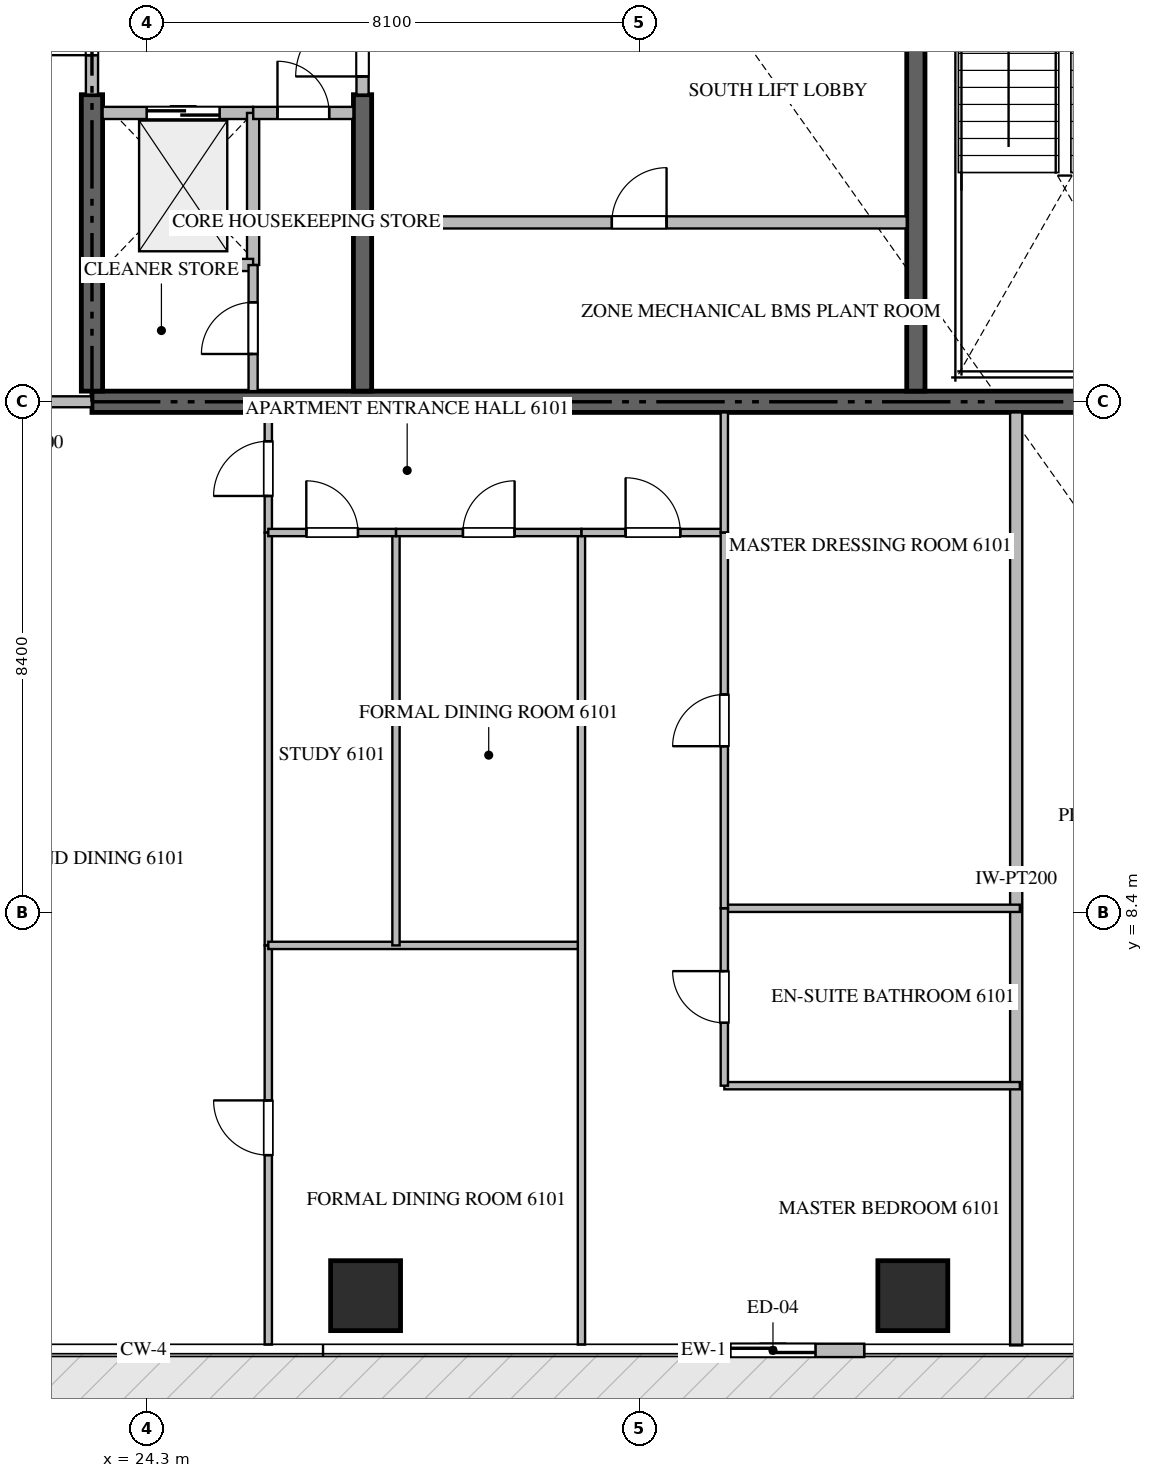
"""IFC4 building model, lengths in metres.
Left out: names, types, materials, properties, quantities, classifications, styles, units other than length and angle.
Written with IfcOpenShell. Run it as: python <this file> out.ifc"""

import sys

from ifc_helpers import new_model, si_unit, direction, frame, frame_2d, origin, origin_2d, place, context, subcontext, project, spatial, rectangle, extrude, source, transform, mapped, element, fill, save


model = new_model("IFC4")
c1 = context("Model", 3, precision=1e-05, world=origin(), true_north=direction((0.0, 1.0)))
c2 = subcontext(c1, "Body", "Model", "MODEL_VIEW")
j1 = project(units=[si_unit("LENGTHUNIT", "METRE"), si_unit("PLANEANGLEUNIT", "RADIAN")], contexts=[c1])
p1 = place(None, origin())
s1 = spatial("IfcSite", under=j1, at=p1, CompositionType="ELEMENT")
p2 = place(p1, origin())
s2 = spatial("IfcBuilding", under=s1, at=p2, CompositionType="ELEMENT")
p3 = place(p2, frame((0.0, 0.0, 245.1)))
s3 = spatial("IfcBuildingStorey", under=s2, at=p3, CompositionType="ELEMENT", Elevation=245.1)
p4 = place(p3, frame((23.4, 16.8, -0.26), z_axis=(0.0, 0.0, 1.0), x_axis=(1.0, 0.0, 0.0)))
e1 = element("IfcWall", 1, at=p4, inside=s3, PredefinedType="SHEAR", context=c2, shape_type="SweptSolid", body=[
    extrude(rectangle(XDim=18.0, YDim=0.35, at=frame_2d((9.0, 0.0))), origin(), (0.0, 0.0, 1.0), 3.848),
])
p5 = place(p3, frame((23.4, 16.975, -0.26), z_axis=(0.0, 0.0, 1.0), x_axis=(0.0, 1.0, 0.0)))
e2 = element("IfcWall", 2, at=p5, inside=s3, PredefinedType="SHEAR", context=c2, shape_type="SweptSolid", body=[
    extrude(rectangle(XDim=4.875, YDim=0.35, at=frame_2d((2.438, 0.0))), origin(), (0.0, 0.0, 1.0), 3.848),
])
p6 = place(p3, frame((27.85, 16.975, -0.26), z_axis=(0.0, 0.0, 1.0), x_axis=(0.0, 1.0, 0.0)))
e3 = element("IfcWall", 3, at=p6, inside=s3, PredefinedType="SHEAR", context=c2, shape_type="SweptSolid", body=[
    extrude(rectangle(XDim=4.875, YDim=0.3, at=frame_2d((2.438, 0.0))), origin(), (0.0, 0.0, 1.0), 3.848),
])
p7 = place(p3, frame((36.95, 16.975, -0.26), z_axis=(0.0, 0.0, 1.0), x_axis=(0.0, 1.0, 0.0)))
e4 = element("IfcWall", 4, at=p7, inside=s3, PredefinedType="SHEAR", context=c2, shape_type="SweptSolid", body=[
    extrude(rectangle(XDim=8.375, YDim=0.3, at=frame_2d((4.188, 0.0))), origin(), (0.0, 0.0, 1.0), 3.848),
])
m1 = source(origin(), c2, "Body", "SweptSolid", [
    extrude(rectangle(XDim=1.15, YDim=1.15, at=origin_2d()), origin(), (0.0, 0.0, 1.0), 3.85),
])
for number, where, z_axis, x_axis in (
    (5, (27.9, 2.1, -0.26), (0.0, 0.0, 1.0), (1.0, 0.0, 0.0)),
    (6, (36.9, 2.1, -0.26), (0.0, 0.0, 1.0), (1.0, 0.0, 0.0)),
):
    element("IfcColumn", number, at=place(p3, frame(where, z_axis=z_axis, x_axis=x_axis)), inside=s3, PredefinedType="COLUMN", context=c2, shape_type="MappedRepresentation", body=[
        mapped(m1, transform((0.0, 0.0, 0.0), scale=1.0)),
    ])
p8 = place(p3, frame((33.1, 1.2, 0.0), z_axis=(0.0, 0.0, 1.0), x_axis=(1.0, 0.0, 0.0)))
e7 = element("IfcWall", 7, at=p8, inside=s3, PredefinedType="ELEMENTEDWALL", context=c2, shape_type="SweptSolid", body=[
    extrude(rectangle(XDim=3.0, YDim=0.22, at=frame_2d((1.5, 0.0))), origin(), (0.0, 0.0, 1.0), 3.575),
])
p9 = place(p8, frame((0.8, 0.0, 0.0)))
e8 = element("IfcOpeningElement", 8, at=p9, cuts=e7, PredefinedType="OPENING", context=c2, shape_type="SweptSolid", body=[
    extrude(rectangle(XDim=1.4, YDim=2.25, at=frame_2d((0.7, 1.125))), frame((0.0, 0.12, 0.0), z_axis=(0.0, -1.0, 0.0), x_axis=(1.0, 0.0, 0.0)), (0.0, 0.0, 1.0), 0.24),
])
p10 = place(p3, frame((23.575, 21.55, 0.0), z_axis=(0.0, 0.0, 1.0), x_axis=(1.0, 0.0, 0.0)))
e9 = element("IfcWall", 9, at=p10, inside=s3, PredefinedType="STANDARD", context=c2, shape_type="SweptSolid", body=[
    extrude(rectangle(XDim=2.475, YDim=0.2, at=frame_2d((1.238, 0.0))), origin(), (0.0, 0.0, 1.0), 3.59),
])
p11 = place(p10, frame((0.725, 0.0, 0.0)))
e10 = element("IfcOpeningElement", 10, at=p11, cuts=e9, PredefinedType="OPENING", context=c2, shape_type="SweptSolid", body=[
    extrude(rectangle(XDim=1.2, YDim=2.2, at=frame_2d((0.6, 1.1))), frame((0.0, 0.11, 0.0), z_axis=(0.0, -1.0, 0.0), x_axis=(1.0, 0.0, 0.0)), (0.0, 0.0, 1.0), 0.22),
])
p12 = place(p3, frame((26.05, 19.05, 0.0), z_axis=(0.0, 0.0, 1.0), x_axis=(0.0, 1.0, 0.0)))
e11 = element("IfcWall", 11, at=p12, inside=s3, PredefinedType="STANDARD", context=c2, shape_type="SweptSolid", body=[
    extrude(rectangle(XDim=2.5, YDim=0.2, at=frame_2d((1.25, 0.0))), origin(), (0.0, 0.0, 1.0), 3.59),
])
p13 = place(p3, frame((23.575, 19.05, 0.0), z_axis=(0.0, 0.0, 1.0), x_axis=(1.0, 0.0, 0.0)))
e12 = element("IfcWall", 12, at=p13, inside=s3, PredefinedType="STANDARD", context=c2, shape_type="SweptSolid", body=[
    extrude(rectangle(XDim=2.475, YDim=0.2, at=frame_2d((1.238, 0.0))), origin(), (0.0, 0.0, 1.0), 3.59),
])
p14 = place(p3, frame((26.052, 21.55, 0.0), z_axis=(0.0, 0.0, 1.0), x_axis=(1.0, 0.0, 0.0)))
e13 = element("IfcWall", 13, at=p14, inside=s3, PredefinedType="STANDARD", context=c2, shape_type="SweptSolid", body=[
    extrude(rectangle(XDim=1.648, YDim=0.2, at=frame_2d((0.824, 0.0))), origin(), (0.0, 0.0, 1.0), 3.59),
])
p15 = place(p14, frame((0.399, 0.0, 0.0)))
e14 = element("IfcOpeningElement", 14, at=p15, cuts=e13, PredefinedType="OPENING", context=c2, shape_type="SweptSolid", body=[
    extrude(rectangle(XDim=0.85, YDim=2.1, at=frame_2d((0.425, 1.05))), frame((0.0, 0.11, 0.0), z_axis=(0.0, -1.0, 0.0), x_axis=(1.0, 0.0, 0.0)), (0.0, 0.0, 1.0), 0.22),
])
p16 = place(p3, frame((23.4, 21.852, 0.0), z_axis=(0.0, 0.0, 1.0), x_axis=(0.0, 1.0, 0.0)))
e15 = element("IfcWall", 15, at=p16, inside=s3, PredefinedType="STANDARD", context=c2, shape_type="SweptSolid", body=[
    extrude(rectangle(XDim=2.396, YDim=0.2, at=frame_2d((1.198, 0.0))), origin(), (0.0, 0.0, 1.0), 3.59),
])
p17 = place(p16, frame((0.648, 0.0, 0.0)))
e16 = element("IfcOpeningElement", 16, at=p17, cuts=e15, PredefinedType="OPENING", context=c2, shape_type="SweptSolid", body=[
    extrude(rectangle(XDim=1.1, YDim=2.15, at=frame_2d((0.55, 1.075))), frame((0.0, 0.11, 0.0), z_axis=(0.0, -1.0, 0.0), x_axis=(1.0, 0.0, 0.0)), (0.0, 0.0, 1.0), 0.22),
])
p18 = place(p3, frame((27.85, 21.852, 0.0), z_axis=(0.0, 0.0, 1.0), x_axis=(0.0, 1.0, 0.0)))
e17 = element("IfcWall", 17, at=p18, inside=s3, PredefinedType="STANDARD", context=c2, shape_type="SweptSolid", body=[
    extrude(rectangle(XDim=1.696, YDim=0.2, at=frame_2d((0.848, 0.0))), origin(), (0.0, 0.0, 1.0), 3.59),
])
p19 = place(p18, frame((0.298, 0.0, 0.0)))
e18 = element("IfcOpeningElement", 18, at=p19, cuts=e17, PredefinedType="OPENING", context=c2, shape_type="SweptSolid", body=[
    extrude(rectangle(XDim=1.1, YDim=2.15, at=frame_2d((0.55, 1.075))), frame((0.0, 0.11, 0.0), z_axis=(0.0, -1.0, 0.0), x_axis=(1.0, 0.0, 0.0)), (0.0, 0.0, 1.0), 0.22),
])
p20 = place(p3, frame((26.05, 16.975, 0.0), z_axis=(0.0, 0.0, 1.0), x_axis=(0.0, 1.0, 0.0)))
e19 = element("IfcWall", 19, at=p20, inside=s3, PredefinedType="PARTITIONING", context=c2, shape_type="SweptSolid", body=[
    extrude(rectangle(XDim=2.073, YDim=0.15, at=frame_2d((1.037, 0.0))), origin(), (0.0, 0.0, 1.0), 3.59),
])
p21 = place(p20, frame((0.611, 0.0, 0.0)))
e20 = element("IfcOpeningElement", 20, at=p21, cuts=e19, PredefinedType="OPENING", context=c2, shape_type="SweptSolid", body=[
    extrude(rectangle(XDim=0.85, YDim=2.1, at=frame_2d((0.425, 1.05))), frame((0.0, 0.085, 0.0), z_axis=(0.0, -1.0, 0.0), x_axis=(1.0, 0.0, 0.0)), (0.0, 0.0, 1.0), 0.17),
])
p22 = place(p3, frame((28.0, 19.75, 0.0), z_axis=(0.0, 0.0, 1.0), x_axis=(1.0, 0.0, 0.0)))
e21 = element("IfcWall", 21, at=p22, inside=s3, PredefinedType="STANDARD", context=c2, shape_type="SweptSolid", body=[
    extrude(rectangle(XDim=8.8, YDim=0.2, at=frame_2d((4.4, 0.0))), origin(), (0.0, 0.0, 1.0), 3.59),
])
p23 = place(p22, frame((3.95, 0.0, 0.0)))
e22 = element("IfcOpeningElement", 22, at=p23, cuts=e21, PredefinedType="OPENING", context=c2, shape_type="SweptSolid", body=[
    extrude(rectangle(XDim=0.9, YDim=2.1, at=frame_2d((0.45, 1.05))), frame((0.0, 0.11, 0.0), z_axis=(0.0, -1.0, 0.0), x_axis=(1.0, 0.0, 0.0)), (0.0, 0.0, 1.0), 0.22),
])
p24 = place(p3, frame((38.6, 1.282, 0.0), z_axis=(0.0, 0.0, 1.0), x_axis=(0.0, 1.0, 0.0)))
e23 = element("IfcWall", 23, at=p24, inside=s3, PredefinedType="PARTITIONING", context=c2, shape_type="SweptSolid", body=[
    extrude(rectangle(XDim=15.343, YDim=0.2, at=frame_2d((7.671, 0.0))), origin(), (0.0, 0.0, 1.0), 3.59),
])
p25 = place(p3, frame((20.902, 16.8, 0.0), z_axis=(0.0, 0.0, 1.0), x_axis=(1.0, 0.0, 0.0)))
e24 = element("IfcWall", 24, at=p25, inside=s3, PredefinedType="PARTITIONING", context=c2, shape_type="SweptSolid", body=[
    extrude(rectangle(XDim=2.496, YDim=0.18, at=frame_2d((1.248, 0.0))), origin(), (0.0, 0.0, 1.0), 3.59),
])
p26 = place(p25, frame((0.748, 0.0, 0.0)))
e25 = element("IfcOpeningElement", 25, at=p26, cuts=e24, PredefinedType="OPENING", context=c2, shape_type="SweptSolid", body=[
    extrude(rectangle(XDim=1.0, YDim=2.15, at=frame_2d((0.5, 1.075))), frame((0.0, 0.1, 0.0), z_axis=(0.0, -1.0, 0.0), x_axis=(1.0, 0.0, 0.0)), (0.0, 0.0, 1.0), 0.2),
])
p27 = place(p3, frame((26.3, 14.65, 0.0), z_axis=(0.0, 0.0, 1.0), x_axis=(0.0, 1.0, 0.0)))
e26 = element("IfcWall", 26, at=p27, inside=s3, PredefinedType="PARTITIONING", context=c2, shape_type="SweptSolid", body=[
    extrude(rectangle(XDim=1.975, YDim=0.12, at=frame_2d((0.988, 0.0))), origin(), (0.0, 0.0, 1.0), 3.59),
])
p28 = place(p27, frame((0.601, 0.0, 0.0)))
e27 = element("IfcOpeningElement", 27, at=p28, cuts=e26, PredefinedType="OPENING", context=c2, shape_type="SweptSolid", body=[
    extrude(rectangle(XDim=0.9, YDim=2.1, at=frame_2d((0.45, 1.05))), frame((0.0, 0.07, 0.0), z_axis=(0.0, -1.0, 0.0), x_axis=(1.0, 0.0, 0.0)), (0.0, 0.0, 1.0), 0.14),
])
p29 = place(p3, frame((26.3, 1.295, 0.0), z_axis=(0.0, 0.0, 1.0), x_axis=(0.0, 1.0, 0.0)))
e28 = element("IfcWall", 28, at=p29, inside=s3, PredefinedType="PARTITIONING", context=c2, shape_type="SweptSolid", body=[
    extrude(rectangle(XDim=6.565, YDim=0.12, at=frame_2d((3.283, 0.0))), origin(), (0.0, 0.0, 1.0), 3.59),
])
p30 = place(p29, frame((3.116, 0.0, 0.0)))
e29 = element("IfcOpeningElement", 29, at=p30, cuts=e28, PredefinedType="OPENING", context=c2, shape_type="SweptSolid", body=[
    extrude(rectangle(XDim=0.9, YDim=2.1, at=frame_2d((0.45, 1.05))), frame((0.0, 0.07, 0.0), z_axis=(0.0, -1.0, 0.0), x_axis=(1.0, 0.0, 0.0)), (0.0, 0.0, 1.0), 0.14),
])
p31 = place(p3, frame((26.3, 7.862, 0.0), z_axis=(0.0, 0.0, 1.0), x_axis=(0.0, 1.0, 0.0)))
e30 = element("IfcWall", 30, at=p31, inside=s3, PredefinedType="PARTITIONING", context=c2, shape_type="SweptSolid", body=[
    extrude(rectangle(XDim=6.786, YDim=0.12, at=frame_2d((3.393, 0.0))), origin(), (0.0, 0.0, 1.0), 3.59),
])
p32 = place(p3, frame((26.3, 7.86, 0.0), z_axis=(0.0, 0.0, 1.0), x_axis=(1.0, 0.0, 0.0)))
e31 = element("IfcWall", 31, at=p32, inside=s3, PredefinedType="PARTITIONING", context=c2, shape_type="SweptSolid", body=[
    extrude(rectangle(XDim=5.15, YDim=0.12, at=frame_2d((2.575, 0.0))), origin(), (0.0, 0.0, 1.0), 3.59),
])
p33 = place(p3, frame((31.45, 1.295, 0.0), z_axis=(0.0, 0.0, 1.0), x_axis=(0.0, 1.0, 0.0)))
e32 = element("IfcWall", 32, at=p33, inside=s3, PredefinedType="PARTITIONING", context=c2, shape_type="SweptSolid", body=[
    extrude(rectangle(XDim=13.355, YDim=0.12, at=frame_2d((6.677, 0.0))), origin(), (0.0, 0.0, 1.0), 3.59),
])
p34 = place(p3, frame((28.4, 7.86, 0.0), z_axis=(0.0, 0.0, 1.0), x_axis=(0.0, 1.0, 0.0)))
e33 = element("IfcWall", 33, at=p34, inside=s3, PredefinedType="PARTITIONING", context=c2, shape_type="SweptSolid", body=[
    extrude(rectangle(XDim=6.79, YDim=0.12, at=frame_2d((3.395, 0.0))), origin(), (0.0, 0.0, 1.0), 3.59),
])
p35 = place(p3, frame((26.3, 14.65, 0.0), z_axis=(0.0, 0.0, 1.0), x_axis=(1.0, 0.0, 0.0)))
e34 = element("IfcWall", 34, at=p35, inside=s3, PredefinedType="PARTITIONING", context=c2, shape_type="SweptSolid", body=[
    extrude(rectangle(XDim=2.1, YDim=0.12, at=frame_2d((1.05, 0.0))), origin(), (0.0, 0.0, 1.0), 3.59),
])
p36 = place(p35, frame((0.625, 0.0, 0.0)))
e35 = element("IfcOpeningElement", 35, at=p36, cuts=e34, PredefinedType="OPENING", context=c2, shape_type="SweptSolid", body=[
    extrude(rectangle(XDim=0.85, YDim=2.1, at=frame_2d((0.425, 1.05))), frame((0.0, 0.07, 0.0), z_axis=(0.0, -1.0, 0.0), x_axis=(1.0, 0.0, 0.0)), (0.0, 0.0, 1.0), 0.14),
])
p37 = place(p3, frame((28.402, 14.65, 0.0), z_axis=(0.0, 0.0, 1.0), x_axis=(1.0, 0.0, 0.0)))
e36 = element("IfcWall", 36, at=p37, inside=s3, PredefinedType="PARTITIONING", context=c2, shape_type="SweptSolid", body=[
    extrude(rectangle(XDim=3.048, YDim=0.12, at=frame_2d((1.524, 0.0))), origin(), (0.0, 0.0, 1.0), 3.59),
])
p38 = place(p37, frame((1.099, 0.0, 0.0)))
e37 = element("IfcOpeningElement", 37, at=p38, cuts=e36, PredefinedType="OPENING", context=c2, shape_type="SweptSolid", body=[
    extrude(rectangle(XDim=0.85, YDim=2.1, at=frame_2d((0.425, 1.05))), frame((0.0, 0.07, 0.0), z_axis=(0.0, -1.0, 0.0), x_axis=(1.0, 0.0, 0.0)), (0.0, 0.0, 1.0), 0.14),
])
p39 = place(p3, frame((31.452, 14.65, 0.0), z_axis=(0.0, 0.0, 1.0), x_axis=(1.0, 0.0, 0.0)))
e38 = element("IfcWall", 38, at=p39, inside=s3, PredefinedType="PARTITIONING", context=c2, shape_type="SweptSolid", body=[
    extrude(rectangle(XDim=2.348, YDim=0.12, at=frame_2d((1.174, 0.0))), origin(), (0.0, 0.0, 1.0), 3.59),
])
p40 = place(p39, frame((0.724, 0.0, 0.0)))
e39 = element("IfcOpeningElement", 39, at=p40, cuts=e38, PredefinedType="OPENING", context=c2, shape_type="SweptSolid", body=[
    extrude(rectangle(XDim=0.9, YDim=2.1, at=frame_2d((0.45, 1.05))), frame((0.0, 0.07, 0.0), z_axis=(0.0, -1.0, 0.0), x_axis=(1.0, 0.0, 0.0)), (0.0, 0.0, 1.0), 0.14),
])
for number, where, z_axis, x_axis in (
    (40, (33.8, 5.553, 0.0), (0.0, 0.0, 1.0), (1.0, 0.0, 0.0)),
    (41, (33.8, 8.47, 0.0), (0.0, 0.0, 1.0), (1.0, 0.0, 0.0)),
):
    element("IfcWall", number, at=place(p3, frame(where, z_axis=z_axis, x_axis=x_axis)), inside=s3, PredefinedType="PARTITIONING", context=c2, shape_type="SweptSolid", body=[
        extrude(rectangle(XDim=4.86, YDim=0.12, at=frame_2d((2.43, 0.0))), origin(), (0.0, 0.0, 1.0), 3.59),
    ])
p41 = place(p3, frame((33.8, 5.553, 0.0), z_axis=(0.0, 0.0, 1.0), x_axis=(0.0, 1.0, 0.0)))
e42 = element("IfcWall", 42, at=p41, inside=s3, PredefinedType="PARTITIONING", context=c2, shape_type="SweptSolid", body=[
    extrude(rectangle(XDim=2.917, YDim=0.12, at=frame_2d((1.458, 0.0))), origin(), (0.0, 0.0, 1.0), 3.59),
])
p42 = place(p41, frame((1.034, 0.0, 0.0)))
e43 = element("IfcOpeningElement", 43, at=p42, cuts=e42, PredefinedType="OPENING", context=c2, shape_type="SweptSolid", body=[
    extrude(rectangle(XDim=0.85, YDim=2.1, at=frame_2d((0.425, 1.05))), frame((0.0, 0.07, 0.0), z_axis=(0.0, -1.0, 0.0), x_axis=(1.0, 0.0, 0.0)), (0.0, 0.0, 1.0), 0.14),
])
p43 = place(p3, frame((33.8, 8.472, 0.0), z_axis=(0.0, 0.0, 1.0), x_axis=(0.0, 1.0, 0.0)))
e44 = element("IfcWall", 44, at=p43, inside=s3, PredefinedType="PARTITIONING", context=c2, shape_type="SweptSolid", body=[
    extrude(rectangle(XDim=6.178, YDim=0.12, at=frame_2d((3.089, 0.0))), origin(), (0.0, 0.0, 1.0), 3.59),
])
p44 = place(p43, frame((2.664, 0.0, 0.0)))
e45 = element("IfcOpeningElement", 45, at=p44, cuts=e44, PredefinedType="OPENING", context=c2, shape_type="SweptSolid", body=[
    extrude(rectangle(XDim=0.85, YDim=2.1, at=frame_2d((0.425, 1.05))), frame((0.0, 0.07, 0.0), z_axis=(0.0, -1.0, 0.0), x_axis=(1.0, 0.0, 0.0)), (0.0, 0.0, 1.0), 0.14),
])
p45 = place(p3, frame((33.8, 14.652, 0.0), z_axis=(0.0, 0.0, 1.0), x_axis=(0.0, 1.0, 0.0)))
e46 = element("IfcWall", 46, at=p45, inside=s3, PredefinedType="PARTITIONING", context=c2, shape_type="SweptSolid", body=[
    extrude(rectangle(XDim=1.973, YDim=0.12, at=frame_2d((0.986, 0.0))), origin(), (0.0, 0.0, 1.0), 3.59),
])
m2 = source(origin(), c2, "Body", "SweptSolid", [
    extrude(rectangle(XDim=1.4, YDim=2.25, at=frame_2d((0.7, 1.125))), frame((0.0, 0.025, 0.0), z_axis=(0.0, -1.0, 0.0), x_axis=(1.0, 0.0, 0.0)), (0.0, 0.0, 1.0), 0.05),
])
p46 = place(p9, origin())
e47 = element("IfcDoor", 47, at=p46, inside=s3, OperationType="SLIDING_TO_LEFT", PredefinedType="DOOR", context=c2, shape_type="MappedRepresentation", body=[
    mapped(m2, transform((0.0, 0.0, 0.0), scale=1.0)),
])
fill(e8, e47)
m3 = source(origin(), c2, "Body", "SweptSolid", [
    extrude(rectangle(XDim=1.2, YDim=2.2, at=frame_2d((0.6, 1.1))), frame((0.0, 0.025, 0.0), z_axis=(0.0, -1.0, 0.0), x_axis=(1.0, 0.0, 0.0)), (0.0, 0.0, 1.0), 0.05),
])
p47 = place(p11, origin())
e48 = element("IfcDoor", 48, at=p47, inside=s3, OperationType="DOUBLE_DOOR_SLIDING", PredefinedType="DOOR", context=c2, shape_type="MappedRepresentation", body=[
    mapped(m3, transform((0.0, 0.0, 0.0), scale=1.0)),
])
fill(e10, e48)
m4 = source(origin(), c2, "Body", "SweptSolid", [
    extrude(rectangle(XDim=0.85, YDim=2.1, at=frame_2d((0.425, 1.05))), frame((0.0, 0.025, 0.0), z_axis=(0.0, -1.0, 0.0), x_axis=(1.0, 0.0, 0.0)), (0.0, 0.0, 1.0), 0.05),
])
p48 = place(p15, origin())
e49 = element("IfcDoor", 49, at=p48, inside=s3, OperationType="SINGLE_SWING_LEFT", PredefinedType="DOOR", context=c2, shape_type="MappedRepresentation", body=[
    mapped(m4, transform((0.0, 0.0, 0.0), scale=1.0)),
])
fill(e14, e49)
m5 = source(origin(), c2, "Body", "SweptSolid", [
    extrude(rectangle(XDim=1.1, YDim=2.15, at=frame_2d((0.55, 1.075))), frame((0.0, 0.025, 0.0), z_axis=(0.0, -1.0, 0.0), x_axis=(1.0, 0.0, 0.0)), (0.0, 0.0, 1.0), 0.05),
])
p49 = place(p17, origin())
e50 = element("IfcDoor", 50, at=p49, inside=s3, OperationType="SINGLE_SWING_LEFT", PredefinedType="DOOR", context=c2, shape_type="MappedRepresentation", body=[
    mapped(m5, transform((0.0, 0.0, 0.0), scale=1.0)),
])
fill(e16, e50)
p50 = place(p19, origin())
e51 = element("IfcDoor", 51, at=p50, inside=s3, OperationType="SINGLE_SWING_LEFT", PredefinedType="DOOR", context=c2, shape_type="MappedRepresentation", body=[
    mapped(m5, transform((0.0, 0.0, 0.0), scale=1.0)),
])
fill(e18, e51)
p51 = place(p21, origin())
e52 = element("IfcDoor", 52, at=p51, inside=s3, OperationType="SINGLE_SWING_LEFT", PredefinedType="DOOR", context=c2, shape_type="MappedRepresentation", body=[
    mapped(m4, transform((0.0, 0.0, 0.0), scale=1.0)),
])
fill(e20, e52)
m6 = source(origin(), c2, "Body", "SweptSolid", [
    extrude(rectangle(XDim=0.9, YDim=2.1, at=frame_2d((0.45, 1.05))), frame((0.0, 0.025, 0.0), z_axis=(0.0, -1.0, 0.0), x_axis=(1.0, 0.0, 0.0)), (0.0, 0.0, 1.0), 0.05),
])
p52 = place(p23, origin())
e53 = element("IfcDoor", 53, at=p52, inside=s3, OperationType="SINGLE_SWING_RIGHT", PredefinedType="DOOR", context=c2, shape_type="MappedRepresentation", body=[
    mapped(m6, transform((0.0, 0.0, 0.0), scale=1.0)),
])
fill(e22, e53)
p53 = place(p28, origin())
e54 = element("IfcDoor", 54, at=p53, inside=s3, OperationType="SINGLE_SWING_LEFT", PredefinedType="DOOR", context=c2, shape_type="MappedRepresentation", body=[
    mapped(m6, transform((0.0, 0.0, 0.0), scale=1.0)),
])
fill(e27, e54)
p54 = place(p30, origin())
e55 = element("IfcDoor", 55, at=p54, inside=s3, OperationType="SINGLE_SWING_RIGHT", PredefinedType="DOOR", context=c2, shape_type="MappedRepresentation", body=[
    mapped(m6, transform((0.0, 0.0, 0.0), scale=1.0)),
])
fill(e29, e55)
p55 = place(p36, origin())
e56 = element("IfcDoor", 56, at=p55, inside=s3, OperationType="SINGLE_SWING_LEFT", PredefinedType="DOOR", context=c2, shape_type="MappedRepresentation", body=[
    mapped(m4, transform((0.0, 0.0, 0.0), scale=1.0)),
])
fill(e35, e56)
p56 = place(p38, origin())
e57 = element("IfcDoor", 57, at=p56, inside=s3, OperationType="SINGLE_SWING_RIGHT", PredefinedType="DOOR", context=c2, shape_type="MappedRepresentation", body=[
    mapped(m4, transform((0.0, 0.0, 0.0), scale=1.0)),
])
fill(e37, e57)
p57 = place(p40, origin())
e58 = element("IfcDoor", 58, at=p57, inside=s3, OperationType="SINGLE_SWING_LEFT", PredefinedType="DOOR", context=c2, shape_type="MappedRepresentation", body=[
    mapped(m6, transform((0.0, 0.0, 0.0), scale=1.0)),
])
fill(e39, e58)
p58 = place(p42, origin())
e59 = element("IfcDoor", 59, at=p58, inside=s3, OperationType="SINGLE_SWING_RIGHT", PredefinedType="DOOR", context=c2, shape_type="MappedRepresentation", body=[
    mapped(m4, transform((0.0, 0.0, 0.0), scale=1.0)),
])
fill(e43, e59)
p59 = place(p44, origin())
e60 = element("IfcDoor", 60, at=p59, inside=s3, OperationType="SINGLE_SWING_LEFT", PredefinedType="DOOR", context=c2, shape_type="MappedRepresentation", body=[
    mapped(m4, transform((0.0, 0.0, 0.0), scale=1.0)),
])
fill(e45, e60)
save(model, sys.argv[1])
